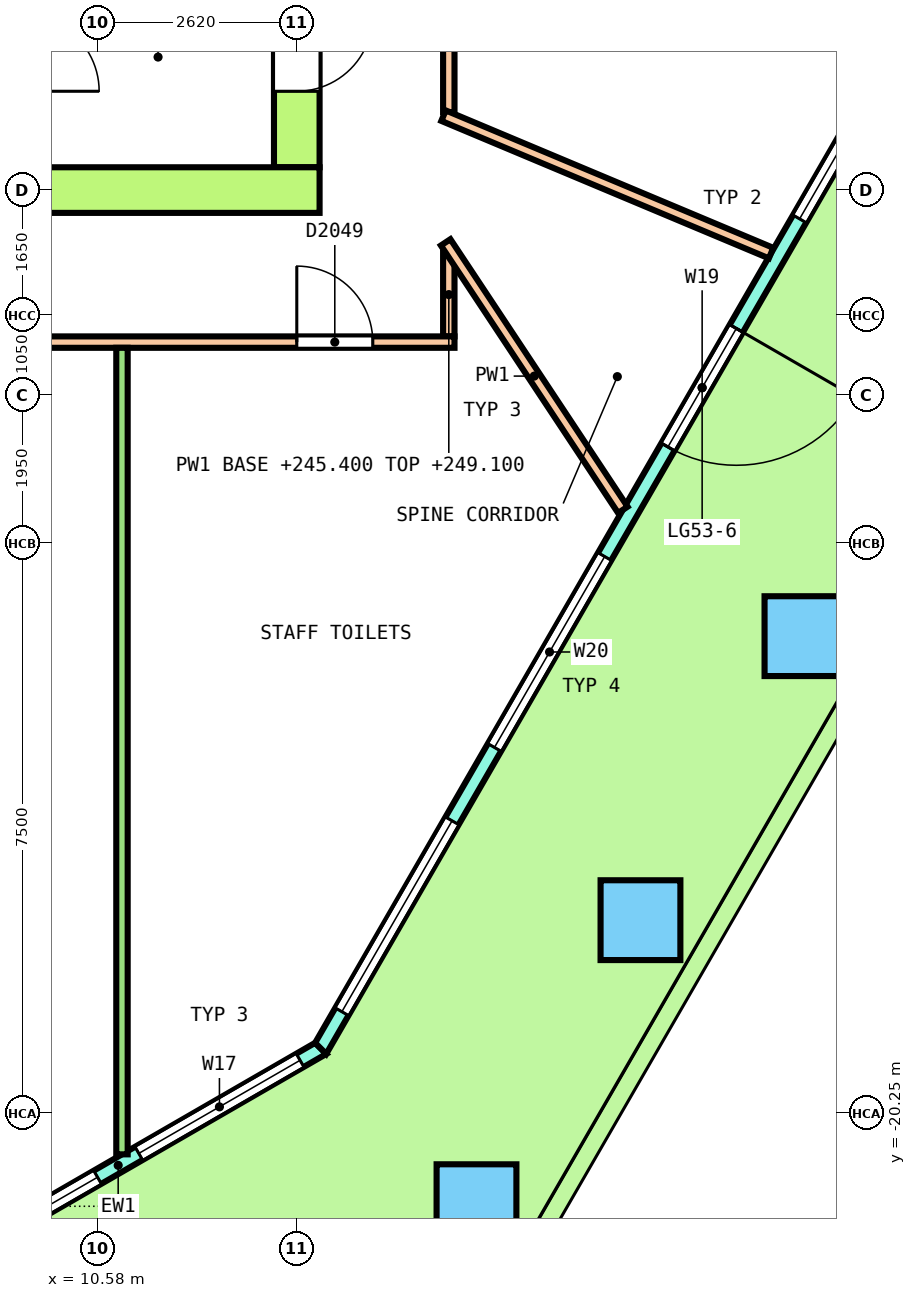
"""IFC4 building model, lengths in metres.
Left out: names, types, materials, properties, quantities, classifications, styles, units other than length and angle.
Written with IfcOpenShell. Run it as: python <this file> out.ifc"""

import sys

from ifc_helpers import new_model, si_unit, direction, frame, frame_2d, origin, origin_2d, place, context, subcontext, project, spatial, polyline, rectangle, outline, extrude, element, fill, save


model = new_model("IFC4")
c1 = context("Model", 3, precision=1e-05, world=origin(), true_north=direction((0.0, 1.0)))
c2 = subcontext(c1, "Body", "Model", "MODEL_VIEW")
j1 = project(units=[si_unit("LENGTHUNIT", "METRE"), si_unit("PLANEANGLEUNIT", "RADIAN")], contexts=[c1])
p1 = place(None, origin())
s1 = spatial("IfcSite", under=j1, at=p1, CompositionType="ELEMENT")
p2 = place(p1, origin())
s2 = spatial("IfcBuilding", under=s1, at=p2, CompositionType="ELEMENT")
p3 = place(p2, frame((0.0, 0.0, 245.4)))
s3 = spatial("IfcBuildingStorey", under=s2, at=p3, CompositionType="ELEMENT", Elevation=245.4)
p4 = place(p3, frame((15.564, -21.442, 0.0), z_axis=(-0.018113993821, -0.031348572332, 0.999344360189), x_axis=(0.500358082912, 0.865061234454, 0.036205655771)))
e1 = element("IfcColumn", 1, at=p4, inside=s3, PredefinedType="COLUMN", context=c2, shape_type="SweptSolid", body=[
    extrude(rectangle(XDim=1.05, YDim=1.05, at=origin_2d()), origin(), (0.0, 0.0, 1.0), 3.653),
])
p5 = place(p3, frame((17.722, -17.705, 0.0), z_axis=(-0.010899694483, -0.018857140148, 0.999762774325), x_axis=(0.500590334681, 0.865410262129, 0.021780611228)))
e2 = element("IfcColumn", 2, at=p5, inside=s3, PredefinedType="COLUMN", context=c2, shape_type="SweptSolid", body=[
    extrude(rectangle(XDim=1.05, YDim=1.05, at=origin_2d()), origin(), (0.0, 0.0, 1.0), 3.651),
])
p6 = place(p3, frame((19.879, -13.969, 0.0), z_axis=(-0.003611705113, -0.006220158806, 0.999974132271), x_axis=(0.50190214813, 0.864894501611, 0.007192689763)))
e3 = element("IfcColumn", 3, at=p6, inside=s3, PredefinedType="COLUMN", context=c2, shape_type="SweptSolid", body=[
    extrude(rectangle(XDim=1.05, YDim=1.05, at=origin_2d()), origin(), (0.0, 0.0, 1.0), 3.65),
])
p7 = place(p3, frame((8.186, -22.469, 0.0), z_axis=(0.0, 0.0, 1.0), x_axis=(0.866029647142, 0.499992650217, 0.0)))
e4 = element("IfcWall", 4, at=p7, inside=s3, PredefinedType="SOLIDWALL", context=c2, shape_type="SweptSolid", body=[
    extrude(outline(polyline([(-0.027, -0.1), (1.008, -0.1), (2.042, -0.1), (3.076, -0.1), (4.111, -0.1), (5.145, -0.1), (6.18, -0.1), (6.126, 0.1), (5.109, 0.1), (4.093, 0.1), (3.076, 0.1), (2.06, 0.1), (1.043, 0.1), (0.027, 0.1), (-0.027, -0.1)])), origin(), (0.0, 0.0, 1.0), 3.7),
])
p8 = place(p7, frame((0.313, 0.0, 0.1)))
e5 = element("IfcOpeningElement", 5, at=p8, cuts=e4, PredefinedType="OPENING", context=c2, shape_type="SweptSolid", body=[
    extrude(rectangle(XDim=2.45, YDim=2.65, at=frame_2d((1.225, 1.325))), frame((0.0, 0.11, 0.0), z_axis=(0.0, -1.0, 0.0), x_axis=(1.0, 0.0, 0.0)), (0.0, 0.0, 1.0), 0.22),
])
p9 = place(p7, frame((3.39, 0.0, 0.1)))
e6 = element("IfcOpeningElement", 6, at=p9, cuts=e4, PredefinedType="OPENING", context=c2, shape_type="SweptSolid", body=[
    extrude(rectangle(XDim=2.45, YDim=2.65, at=frame_2d((1.225, 1.325))), frame((0.0, 0.11, 0.0), z_axis=(0.0, -1.0, 0.0), x_axis=(1.0, 0.0, 0.0)), (0.0, 0.0, 1.0), 0.22),
])
p10 = place(p3, frame((13.515, -19.392, 0.0), z_axis=(0.0, 0.0, 1.0), x_axis=(0.499997939216, 0.866026593575, 0.0)))
e7 = element("IfcWall", 7, at=p10, inside=s3, PredefinedType="SOLIDWALL", context=c2, shape_type="SweptSolid", body=[
    extrude(outline(polyline([(-0.027, -0.1), (0.979, -0.1), (1.986, -0.1), (2.992, -0.1), (3.999, -0.1), (5.005, -0.1), (6.011, -0.1), (7.018, -0.1), (8.024, -0.1), (9.03, -0.1), (10.037, -0.1), (11.043, -0.1), (12.049, -0.1), (13.056, -0.1), (14.062, -0.1), (15.068, -0.1), (16.075, -0.1), (17.081, -0.1), (18.087, -0.1), (19.094, -0.1), (20.1, -0.1), (20.046, 0.1), (19.045, 0.1), (18.044, 0.1), (17.043, 0.1), (16.042, 0.1), (15.042, 0.1), (14.041, 0.1), (13.04, 0.1), (12.039, 0.1), (11.038, 0.1), (10.037, 0.1), (9.036, 0.1), (8.035, 0.1), (7.034, 0.1), (6.033, 0.1), (5.032, 0.1), (4.031, 0.1), (3.03, 0.1), (2.029, 0.1), (1.028, 0.1), (0.027, 0.1), (-0.027, -0.1)])), origin(), (0.0, 0.0, 1.0), 3.7),
])
p11 = place(p10, frame((0.557, 0.0, 0.1)))
e8 = element("IfcOpeningElement", 8, at=p11, cuts=e7, PredefinedType="OPENING", context=c2, shape_type="SweptSolid", body=[
    extrude(rectangle(XDim=2.9, YDim=2.65, at=frame_2d((1.45, 1.325))), frame((0.0, 0.11, 0.0), z_axis=(0.0, -1.0, 0.0), x_axis=(1.0, 0.0, 0.0)), (0.0, 0.0, 1.0), 0.22),
])
p12 = place(p10, frame((4.572, 0.0, 0.1)))
e9 = element("IfcOpeningElement", 9, at=p12, cuts=e7, PredefinedType="OPENING", context=c2, shape_type="SweptSolid", body=[
    extrude(rectangle(XDim=2.9, YDim=2.65, at=frame_2d((1.45, 1.325))), frame((0.0, 0.11, 0.0), z_axis=(0.0, -1.0, 0.0), x_axis=(1.0, 0.0, 0.0)), (0.0, 0.0, 1.0), 0.22),
])
p13 = place(p10, frame((9.137, 0.0, 0.0)))
e10 = element("IfcOpeningElement", 10, at=p13, cuts=e7, PredefinedType="OPENING", context=c2, shape_type="SweptSolid", body=[
    extrude(rectangle(XDim=1.8, YDim=2.4, at=frame_2d((0.9, 1.2))), frame((0.0, 0.11, 0.0), z_axis=(0.0, -1.0, 0.0), x_axis=(1.0, 0.0, 0.0)), (0.0, 0.0, 1.0), 0.22),
])
p14 = place(p10, frame((9.137, 0.0, 2.55)))
e11 = element("IfcOpeningElement", 11, at=p14, cuts=e7, PredefinedType="OPENING", context=c2, shape_type="SweptSolid", body=[
    extrude(rectangle(XDim=1.8, YDim=0.2, at=frame_2d((0.9, 0.1))), frame((0.0, 0.11, 0.0), z_axis=(0.0, -1.0, 0.0), x_axis=(1.0, 0.0, 0.0)), (0.0, 0.0, 1.0), 0.22),
])
p15 = place(p10, frame((12.601, 0.0, 0.1)))
e12 = element("IfcOpeningElement", 12, at=p15, cuts=e7, PredefinedType="OPENING", context=c2, shape_type="SweptSolid", body=[
    extrude(rectangle(XDim=2.9, YDim=2.65, at=frame_2d((1.45, 1.325))), frame((0.0, 0.11, 0.0), z_axis=(0.0, -1.0, 0.0), x_axis=(1.0, 0.0, 0.0)), (0.0, 0.0, 1.0), 0.22),
])
p16 = place(p10, frame((16.616, 0.0, 0.1)))
e13 = element("IfcOpeningElement", 13, at=p16, cuts=e7, PredefinedType="OPENING", context=c2, shape_type="SweptSolid", body=[
    extrude(rectangle(XDim=2.9, YDim=2.65, at=frame_2d((1.45, 1.325))), frame((0.0, 0.11, 0.0), z_axis=(0.0, -1.0, 0.0), x_axis=(1.0, 0.0, 0.0)), (0.0, 0.0, 1.0), 0.22),
])
p17 = place(p3, frame((-13.5, -8.1, 0.0), z_axis=(0.0, 0.0, 1.0), x_axis=(1.0, 0.0, 0.0)))
e14 = element("IfcWall", 14, at=p17, inside=s3, PredefinedType="SHEAR", context=c2, shape_type="SweptSolid", body=[
    extrude(rectangle(XDim=27.0, YDim=0.6, at=frame_2d((13.5, 0.0))), origin(), (0.0, 0.0, 1.0), 3.7),
])
p18 = place(p17, frame((15.05, 0.0, 0.0)))
e15 = element("IfcOpeningElement", 15, at=p18, cuts=e14, PredefinedType="OPENING", context=c2, shape_type="SweptSolid", body=[
    extrude(rectangle(XDim=1.2, YDim=2.1, at=frame_2d((0.6, 1.05))), frame((0.0, 0.31, 0.0), z_axis=(0.0, -1.0, 0.0), x_axis=(1.0, 0.0, 0.0)), (0.0, 0.0, 1.0), 0.62),
])
p19 = place(p3, frame((13.2, -7.8, 0.0), z_axis=(0.0, 0.0, 1.0), x_axis=(0.0, 1.0, 0.0)))
e16 = element("IfcWall", 16, at=p19, inside=s3, PredefinedType="SHEAR", context=c2, shape_type="SweptSolid", body=[
    extrude(rectangle(XDim=15.6, YDim=0.6, at=frame_2d((7.8, 0.0))), origin(), (0.0, 0.0, 1.0), 3.7),
])
p20 = place(p19, frame((6.6, 0.0, 0.0)))
e17 = element("IfcOpeningElement", 17, at=p20, cuts=e16, PredefinedType="OPENING", context=c2, shape_type="SweptSolid", body=[
    extrude(rectangle(XDim=2.4, YDim=2.1, at=frame_2d((1.2, 1.05))), frame((0.0, 0.31, 0.0), z_axis=(0.0, -1.0, 0.0), x_axis=(1.0, 0.0, 0.0)), (0.0, 0.0, 1.0), 0.62),
])
p21 = place(p19, frame((13.5, 0.0, 0.0)))
e18 = element("IfcOpeningElement", 18, at=p21, cuts=e16, PredefinedType="OPENING", context=c2, shape_type="SweptSolid", body=[
    extrude(rectangle(XDim=1.2, YDim=2.1, at=frame_2d((0.6, 1.05))), frame((0.0, 0.31, 0.0), z_axis=(0.0, -1.0, 0.0), x_axis=(1.0, 0.0, 0.0)), (0.0, 0.0, 1.0), 0.62),
])
p22 = place(p19, frame((1.0, 0.0, 0.0)))
e19 = element("IfcOpeningElement", 19, at=p22, cuts=e16, PredefinedType="OPENING", context=c2, shape_type="SweptSolid", body=[
    extrude(rectangle(XDim=1.0, YDim=2.1, at=frame_2d((0.5, 1.05))), frame((0.0, 0.31, 0.0), z_axis=(0.0, -1.0, 0.0), x_axis=(1.0, 0.0, 0.0)), (0.0, 0.0, 1.0), 0.62),
])
p23 = place(p3, frame((15.2, -10.025, 0.0), z_axis=(0.0, 0.0, 1.0), x_axis=(0.0, 1.0, 0.0)))
e20 = element("IfcWall", 20, at=p23, inside=s3, PredefinedType="PARTITIONING", context=c2, shape_type="SweptSolid", body=[
    extrude(rectangle(XDim=1.1, YDim=0.15, at=frame_2d((0.55, 0.0))), origin(), (0.0, 0.0, 1.0), 3.7),
])
p24 = place(p3, frame((15.2, -7.075, 0.0), z_axis=(0.0, 0.0, 1.0), x_axis=(0.0, 1.0, 0.0)))
e21 = element("IfcWall", 21, at=p24, inside=s3, PredefinedType="PARTITIONING", context=c2, shape_type="SweptSolid", body=[
    extrude(rectangle(XDim=17.1, YDim=0.15, at=frame_2d((8.55, 0.0))), origin(), (0.0, 0.0, 1.0), 2.8),
])
p25 = place(p24, frame((7.543, 0.0, 0.0)))
e22 = element("IfcOpeningElement", 22, at=p25, cuts=e21, PredefinedType="OPENING", context=c2, shape_type="SweptSolid", body=[
    extrude(rectangle(XDim=1.2, YDim=2.1, at=frame_2d((0.6, 1.05))), frame((0.0, 0.085, 0.0), z_axis=(0.0, -1.0, 0.0), x_axis=(1.0, 0.0, 0.0)), (0.0, 0.0, 1.0), 0.17),
])
p26 = place(p24, frame((12.923, 0.0, 0.0)))
e23 = element("IfcOpeningElement", 23, at=p26, cuts=e21, PredefinedType="OPENING", context=c2, shape_type="SweptSolid", body=[
    extrude(rectangle(XDim=1.2, YDim=2.1, at=frame_2d((0.6, 1.05))), frame((0.0, 0.085, 0.0), z_axis=(0.0, -1.0, 0.0), x_axis=(1.0, 0.0, 0.0)), (0.0, 0.0, 1.0), 0.17),
])
p27 = place(p24, frame((2.836, 0.0, 0.0)))
e24 = element("IfcOpeningElement", 24, at=p27, cuts=e21, PredefinedType="OPENING", context=c2, shape_type="SweptSolid", body=[
    extrude(rectangle(XDim=1.0, YDim=2.1, at=frame_2d((0.5, 1.05))), frame((0.0, 0.085, 0.0), z_axis=(0.0, -1.0, 0.0), x_axis=(1.0, 0.0, 0.0)), (0.0, 0.0, 1.0), 0.17),
])
p28 = place(p3, frame((-15.275, -10.1, 0.0), z_axis=(0.0, 0.0, 1.0), x_axis=(1.0, 0.0, 0.0)))
e25 = element("IfcWall", 25, at=p28, inside=s3, PredefinedType="PARTITIONING", context=c2, shape_type="SweptSolid", body=[
    extrude(rectangle(XDim=30.55, YDim=0.15, at=frame_2d((15.275, 0.0))), origin(), (0.0, 0.0, 1.0), 2.8),
])
p29 = place(p28, frame((3.253, 0.0, 0.0)))
e26 = element("IfcOpeningElement", 26, at=p29, cuts=e25, PredefinedType="OPENING", context=c2, shape_type="SweptSolid", body=[
    extrude(rectangle(XDim=1.2, YDim=2.1, at=frame_2d((0.6, 1.05))), frame((0.0, 0.085, 0.0), z_axis=(0.0, -1.0, 0.0), x_axis=(1.0, 0.0, 0.0)), (0.0, 0.0, 1.0), 0.17),
])
p30 = place(p28, frame((8.58, 0.0, 0.0)))
e27 = element("IfcOpeningElement", 27, at=p30, cuts=e25, PredefinedType="OPENING", context=c2, shape_type="SweptSolid", body=[
    extrude(rectangle(XDim=1.2, YDim=2.1, at=frame_2d((0.6, 1.05))), frame((0.0, 0.085, 0.0), z_axis=(0.0, -1.0, 0.0), x_axis=(1.0, 0.0, 0.0)), (0.0, 0.0, 1.0), 0.17),
])
p31 = place(p28, frame((15.2, 0.0, 0.0)))
e28 = element("IfcOpeningElement", 28, at=p31, cuts=e25, PredefinedType="OPENING", context=c2, shape_type="SweptSolid", body=[
    extrude(rectangle(XDim=1.0, YDim=2.1, at=frame_2d((0.5, 1.05))), frame((0.0, 0.085, 0.0), z_axis=(0.0, -1.0, 0.0), x_axis=(1.0, 0.0, 0.0)), (0.0, 0.0, 1.0), 0.17),
])
p32 = place(p28, frame((23.2, 0.0, 0.0)))
e29 = element("IfcOpeningElement", 29, at=p32, cuts=e25, PredefinedType="OPENING", context=c2, shape_type="SweptSolid", body=[
    extrude(rectangle(XDim=1.2, YDim=2.1, at=frame_2d((0.6, 1.05))), frame((0.0, 0.085, 0.0), z_axis=(0.0, -1.0, 0.0), x_axis=(1.0, 0.0, 0.0)), (0.0, 0.0, 1.0), 0.17),
])
p33 = place(p28, frame((28.475, 0.0, 0.0)))
e30 = element("IfcOpeningElement", 30, at=p33, cuts=e25, PredefinedType="OPENING", context=c2, shape_type="SweptSolid", body=[
    extrude(rectangle(XDim=1.0, YDim=2.1, at=frame_2d((0.5, 1.05))), frame((0.0, 0.085, 0.0), z_axis=(0.0, -1.0, 0.0), x_axis=(1.0, 0.0, 0.0)), (0.0, 0.0, 1.0), 0.17),
])
p34 = place(p3, frame((15.159, -8.788, 0.0), z_axis=(0.0, 0.0, 1.0), x_axis=(0.552215241224, -0.833701581718, 0.0)))
e31 = element("IfcWall", 31, at=p34, inside=s3, PredefinedType="PARTITIONING", context=c2, shape_type="SweptSolid", body=[
    extrude(rectangle(XDim=4.221, YDim=0.15, at=frame_2d((2.111, 0.0))), origin(), (0.0, 0.0, 1.0), 2.8),
])
p35 = place(p3, frame((15.131, -7.121, 0.0), z_axis=(0.0, 0.0, 1.0), x_axis=(0.922131258958, -0.386877165586, 0.0)))
e32 = element("IfcWall", 32, at=p35, inside=s3, PredefinedType="PARTITIONING", context=c2, shape_type="SweptSolid", body=[
    extrude(rectangle(XDim=4.673, YDim=0.15, at=frame_2d((2.336, 0.0))), origin(), (0.0, 0.0, 1.0), 2.8),
])
p36 = place(p3, frame((10.9, -20.786, 0.0), z_axis=(0.0, 0.0, 1.0), x_axis=(0.0, 1.0, 0.0)))
e33 = element("IfcWall", 33, at=p36, inside=s3, PredefinedType="PARTITIONING", context=c2, shape_type="SweptSolid", body=[
    extrude(rectangle(XDim=10.611, YDim=0.15, at=frame_2d((5.305, 0.0))), origin(), (0.0, 0.0, 1.0), 2.8),
])
p37 = place(p8, origin())
e34 = element("IfcWindow", 34, at=p37, inside=s3, PartitioningType="SINGLE_PANEL", PredefinedType="WINDOW", context=c2, shape_type="SweptSolid", body=[
    extrude(rectangle(XDim=2.45, YDim=2.65, at=frame_2d((1.225, 1.325))), frame((0.0, 0.03, 0.0), z_axis=(0.0, -1.0, 0.0), x_axis=(1.0, 0.0, 0.0)), (0.0, 0.0, 1.0), 0.06),
])
fill(e5, e34)
p38 = place(p9, origin())
e35 = element("IfcWindow", 35, at=p38, inside=s3, PartitioningType="SINGLE_PANEL", PredefinedType="WINDOW", context=c2, shape_type="SweptSolid", body=[
    extrude(rectangle(XDim=2.45, YDim=2.65, at=frame_2d((1.225, 1.325))), frame((0.0, 0.03, 0.0), z_axis=(0.0, -1.0, 0.0), x_axis=(1.0, 0.0, 0.0)), (0.0, 0.0, 1.0), 0.06),
])
fill(e6, e35)
p39 = place(p11, origin())
e36 = element("IfcWindow", 36, at=p39, inside=s3, PartitioningType="SINGLE_PANEL", PredefinedType="WINDOW", context=c2, shape_type="SweptSolid", body=[
    extrude(rectangle(XDim=2.9, YDim=2.65, at=frame_2d((1.45, 1.325))), frame((0.0, 0.03, 0.0), z_axis=(0.0, -1.0, 0.0), x_axis=(1.0, 0.0, 0.0)), (0.0, 0.0, 1.0), 0.06),
])
fill(e8, e36)
p40 = place(p12, origin())
e37 = element("IfcWindow", 37, at=p40, inside=s3, PartitioningType="SINGLE_PANEL", PredefinedType="WINDOW", context=c2, shape_type="SweptSolid", body=[
    extrude(rectangle(XDim=2.9, YDim=2.65, at=frame_2d((1.45, 1.325))), frame((0.0, 0.03, 0.0), z_axis=(0.0, -1.0, 0.0), x_axis=(1.0, 0.0, 0.0)), (0.0, 0.0, 1.0), 0.06),
])
fill(e9, e37)
p41 = place(p13, origin())
e38 = element("IfcDoor", 38, at=p41, inside=s3, OperationType="DOUBLE_DOOR_SINGLE_SWING", PredefinedType="DOOR", context=c2, shape_type="SweptSolid", body=[
    extrude(rectangle(XDim=1.8, YDim=2.4, at=frame_2d((0.9, 1.2))), frame((0.0, 0.025, 0.0), z_axis=(0.0, -1.0, 0.0), x_axis=(1.0, 0.0, 0.0)), (0.0, 0.0, 1.0), 0.05),
])
fill(e10, e38)
p42 = place(p14, origin())
e39 = element("IfcWindow", 39, at=p42, inside=s3, PartitioningType="SINGLE_PANEL", PredefinedType="WINDOW", context=c2, shape_type="SweptSolid", body=[
    extrude(rectangle(XDim=1.8, YDim=0.2, at=frame_2d((0.9, 0.1))), frame((0.0, 0.03, 0.0), z_axis=(0.0, -1.0, 0.0), x_axis=(1.0, 0.0, 0.0)), (0.0, 0.0, 1.0), 0.06),
])
fill(e11, e39)
p43 = place(p15, origin())
e40 = element("IfcWindow", 40, at=p43, inside=s3, PartitioningType="SINGLE_PANEL", PredefinedType="WINDOW", context=c2, shape_type="SweptSolid", body=[
    extrude(rectangle(XDim=2.9, YDim=2.65, at=frame_2d((1.45, 1.325))), frame((0.0, 0.03, 0.0), z_axis=(0.0, -1.0, 0.0), x_axis=(1.0, 0.0, 0.0)), (0.0, 0.0, 1.0), 0.06),
])
fill(e12, e40)
p44 = place(p22, origin())
e41 = element("IfcDoor", 41, at=p44, inside=s3, OperationType="SINGLE_SWING_LEFT", PredefinedType="DOOR", context=c2, shape_type="SweptSolid", body=[
    extrude(rectangle(XDim=1.0, YDim=2.1, at=frame_2d((0.5, 1.05))), frame((0.0, 0.25, 0.0), z_axis=(0.0, -1.0, 0.0), x_axis=(1.0, 0.0, 0.0)), (0.0, 0.0, 1.0), 0.5),
])
fill(e19, e41)
p45 = place(p33, origin())
e42 = element("IfcDoor", 42, at=p45, inside=s3, OperationType="SINGLE_SWING_LEFT", PredefinedType="DOOR", context=c2, shape_type="SweptSolid", body=[
    extrude(rectangle(XDim=1.0, YDim=2.1, at=frame_2d((0.5, 1.05))), frame((0.0, 0.025, 0.0), z_axis=(0.0, -1.0, 0.0), x_axis=(1.0, 0.0, 0.0)), (0.0, 0.0, 1.0), 0.05),
])
fill(e30, e42)
save(model, sys.argv[1])
